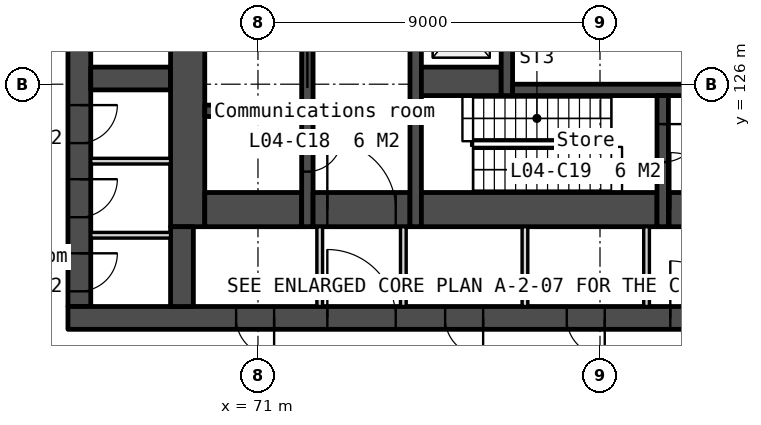
"""IFC4 building model, lengths in metres.
Left out: names, types, materials, properties, quantities, classifications, styles, units other than length and angle.
Written with IfcOpenShell. Run it as: python <this file> out.ifc"""

import sys

from ifc_helpers import new_model, si_unit, direction, frame, frame_2d, origin, place, context, subcontext, project, spatial, rectangle, extrude, element, fill, save


model = new_model("IFC4")
c1 = context("Model", 3, precision=1e-05, world=origin(), true_north=direction((0.0, 1.0)))
c2 = subcontext(c1, "Body", "Model", "MODEL_VIEW")
j1 = project(units=[si_unit("LENGTHUNIT", "METRE"), si_unit("PLANEANGLEUNIT", "RADIAN")], contexts=[c1])
p1 = place(None, origin())
s1 = spatial("IfcSite", under=j1, at=p1, CompositionType="ELEMENT")
p2 = place(p1, origin())
s2 = spatial("IfcBuilding", under=s1, at=p2, CompositionType="ELEMENT")
p3 = place(p2, frame((0.0, 0.0, 25.0)))
s3 = spatial("IfcBuildingStorey", under=s2, at=p3, CompositionType="ELEMENT", Elevation=25.0)
p4 = place(p3, frame((66.3, 133.95, 0.0), z_axis=(0.0, 0.0, 1.0), x_axis=(0.0, -1.0, 0.0)))
e1 = element("IfcWall", 1, at=p4, inside=s3, PredefinedType="SOLIDWALL", context=c2, shape_type="SweptSolid", body=[
    extrude(rectangle(XDim=13.8, YDim=0.6, at=frame_2d((6.9, 0.0))), origin(), (0.0, 0.0, 1.0), 4.7),
])
p5 = place(p4, frame((0.6, 0.0, 0.0)))
e2 = element("IfcOpeningElement", 2, at=p5, cuts=e1, PredefinedType="OPENING", context=c2, shape_type="SweptSolid", body=[
    extrude(rectangle(XDim=1.1, YDim=2.1, at=frame_2d((0.55, 1.05))), frame((0.0, 0.31, 0.0), z_axis=(0.0, -1.0, 0.0), x_axis=(1.0, 0.0, 0.0)), (0.0, 0.0, 1.0), 0.62),
])
p6 = place(p4, frame((12.4, 0.0, 0.0)))
e3 = element("IfcOpeningElement", 3, at=p6, cuts=e1, PredefinedType="OPENING", context=c2, shape_type="SweptSolid", body=[
    extrude(rectangle(XDim=1.0, YDim=2.1, at=frame_2d((0.5, 1.05))), frame((0.0, 0.31, 0.0), z_axis=(0.0, -1.0, 0.0), x_axis=(1.0, 0.0, 0.0)), (0.0, 0.0, 1.0), 0.62),
])
p7 = place(p4, frame((8.5, 0.0, 0.0)))
e4 = element("IfcOpeningElement", 4, at=p7, cuts=e1, PredefinedType="OPENING", context=c2, shape_type="SweptSolid", body=[
    extrude(rectangle(XDim=1.0, YDim=2.1, at=frame_2d((0.5, 1.05))), frame((0.0, 0.31, 0.0), z_axis=(0.0, -1.0, 0.0), x_axis=(1.0, 0.0, 0.0)), (0.0, 0.0, 1.0), 0.62),
])
p8 = place(p4, frame((10.45, 0.0, 0.0)))
e5 = element("IfcOpeningElement", 5, at=p8, cuts=e1, PredefinedType="OPENING", context=c2, shape_type="SweptSolid", body=[
    extrude(rectangle(XDim=1.0, YDim=2.1, at=frame_2d((0.5, 1.05))), frame((0.0, 0.31, 0.0), z_axis=(0.0, -1.0, 0.0), x_axis=(1.0, 0.0, 0.0)), (0.0, 0.0, 1.0), 0.62),
])
p9 = place(p3, frame((66.0, 119.85, 0.0), z_axis=(0.0, 0.0, 1.0), x_axis=(1.0, 0.0, 0.0)))
e6 = element("IfcWall", 6, at=p9, inside=s3, PredefinedType="SOLIDWALL", context=c2, shape_type="SweptSolid", body=[
    extrude(rectangle(XDim=28.0, YDim=0.6, at=frame_2d((14.0, 0.0))), origin(), (0.0, 0.0, 1.0), 4.7),
])
p10 = place(p9, frame((6.825, 0.0, 0.0)))
e7 = element("IfcOpeningElement", 7, at=p10, cuts=e6, PredefinedType="OPENING", context=c2, shape_type="SweptSolid", body=[
    extrude(rectangle(XDim=1.8, YDim=2.1, at=frame_2d((0.9, 1.05))), frame((0.0, 0.31, 0.0), z_axis=(0.0, -1.0, 0.0), x_axis=(1.0, 0.0, 0.0)), (0.0, 0.0, 1.0), 0.62),
])
p11 = place(p9, frame((15.85, 0.0, 0.0)))
e8 = element("IfcOpeningElement", 8, at=p11, cuts=e6, PredefinedType="OPENING", context=c2, shape_type="SweptSolid", body=[
    extrude(rectangle(XDim=1.5, YDim=2.1, at=frame_2d((0.75, 1.05))), frame((0.0, 0.31, 0.0), z_axis=(0.0, -1.0, 0.0), x_axis=(1.0, 0.0, 0.0)), (0.0, 0.0, 1.0), 0.62),
])
p12 = place(p9, frame((19.375, 0.0, 0.0)))
e9 = element("IfcOpeningElement", 9, at=p12, cuts=e6, PredefinedType="OPENING", context=c2, shape_type="SweptSolid", body=[
    extrude(rectangle(XDim=1.8, YDim=2.1, at=frame_2d((0.9, 1.05))), frame((0.0, 0.31, 0.0), z_axis=(0.0, -1.0, 0.0), x_axis=(1.0, 0.0, 0.0)), (0.0, 0.0, 1.0), 0.62),
])
p13 = place(p9, frame((4.425, 0.0, 0.0)))
e10 = element("IfcOpeningElement", 10, at=p13, cuts=e6, PredefinedType="OPENING", context=c2, shape_type="SweptSolid", body=[
    extrude(rectangle(XDim=1.0, YDim=2.1, at=frame_2d((0.5, 1.05))), frame((0.0, 0.31, 0.0), z_axis=(0.0, -1.0, 0.0), x_axis=(1.0, 0.0, 0.0)), (0.0, 0.0, 1.0), 0.62),
])
p14 = place(p9, frame((9.925, 0.0, 0.0)))
e11 = element("IfcOpeningElement", 11, at=p14, cuts=e6, PredefinedType="OPENING", context=c2, shape_type="SweptSolid", body=[
    extrude(rectangle(XDim=1.0, YDim=2.1, at=frame_2d((0.5, 1.05))), frame((0.0, 0.31, 0.0), z_axis=(0.0, -1.0, 0.0), x_axis=(1.0, 0.0, 0.0)), (0.0, 0.0, 1.0), 0.62),
])
p15 = place(p9, frame((13.125, 0.0, 0.0)))
e12 = element("IfcOpeningElement", 12, at=p15, cuts=e6, PredefinedType="OPENING", context=c2, shape_type="SweptSolid", body=[
    extrude(rectangle(XDim=1.0, YDim=2.1, at=frame_2d((0.5, 1.05))), frame((0.0, 0.31, 0.0), z_axis=(0.0, -1.0, 0.0), x_axis=(1.0, 0.0, 0.0)), (0.0, 0.0, 1.0), 0.62),
])
p16 = place(p9, frame((21.725, 0.0, 0.0)))
e13 = element("IfcOpeningElement", 13, at=p16, cuts=e6, PredefinedType="OPENING", context=c2, shape_type="SweptSolid", body=[
    extrude(rectangle(XDim=1.0, YDim=2.1, at=frame_2d((0.5, 1.05))), frame((0.0, 0.31, 0.0), z_axis=(0.0, -1.0, 0.0), x_axis=(1.0, 0.0, 0.0)), (0.0, 0.0, 1.0), 0.62),
])
p17 = place(p9, frame((23.425, 0.0, 0.0)))
e14 = element("IfcOpeningElement", 14, at=p17, cuts=e6, PredefinedType="OPENING", context=c2, shape_type="SweptSolid", body=[
    extrude(rectangle(XDim=1.0, YDim=2.1, at=frame_2d((0.5, 1.05))), frame((0.0, 0.31, 0.0), z_axis=(0.0, -1.0, 0.0), x_axis=(1.0, 0.0, 0.0)), (0.0, 0.0, 1.0), 0.62),
])
p18 = place(p3, frame((66.6, 126.15, 0.0), z_axis=(0.0, 0.0, 1.0), x_axis=(1.0, 0.0, 0.0)))
e15 = element("IfcWall", 15, at=p18, inside=s3, PredefinedType="SOLIDWALL", context=c2, shape_type="SweptSolid", body=[
    extrude(rectangle(XDim=2.1, YDim=0.6, at=frame_2d((1.05, 0.0))), origin(), (0.0, 0.0, 1.0), 4.7),
])
for number, where, z_axis, x_axis in (
    (16, (66.6, 123.975, 0.0), (0.0, 0.0, 1.0), (1.0, 0.0, 0.0)),
    (17, (66.6, 122.025, 0.0), (0.0, 0.0, 1.0), (1.0, 0.0, 0.0)),
):
    element("IfcWall", number, at=place(p3, frame(where, z_axis=z_axis, x_axis=x_axis)), inside=s3, PredefinedType="PARTITIONING", context=c2, shape_type="SweptSolid", body=[
        extrude(rectangle(XDim=2.1, YDim=0.15, at=frame_2d((1.05, 0.0))), origin(), (0.0, 0.0, 1.0), 4.7),
    ])
p19 = place(p3, frame((69.15, 133.95, 0.0), z_axis=(0.0, 0.0, 1.0), x_axis=(0.0, -1.0, 0.0)))
e18 = element("IfcWall", 18, at=p19, inside=s3, PredefinedType="SOLIDWALL", context=c2, shape_type="SweptSolid", body=[
    extrude(rectangle(XDim=11.7, YDim=0.9, at=frame_2d((5.85, 0.0))), origin(), (0.0, 0.0, 1.0), 4.7),
])
p20 = place(p3, frame((69.0, 122.25, 0.0), z_axis=(0.0, 0.0, 1.0), x_axis=(0.0, -1.0, 0.0)))
e19 = element("IfcWall", 19, at=p20, inside=s3, PredefinedType="SOLIDWALL", context=c2, shape_type="SweptSolid", body=[
    extrude(rectangle(XDim=2.1, YDim=0.6, at=frame_2d((1.05, 0.0))), origin(), (0.0, 0.0, 1.0), 4.7),
])
p21 = place(p3, frame((69.6, 125.3, 0.0), z_axis=(0.0, 0.0, 1.0), x_axis=(1.0, 0.0, 0.0)))
e20 = element("IfcWall", 20, at=p21, inside=s3, PredefinedType="SOLIDWALL", context=c2, shape_type="SweptSolid", body=[
    extrude(rectangle(XDim=2.55, YDim=0.3, at=frame_2d((1.275, 0.0))), origin(), (0.0, 0.0, 1.0), 4.7),
])
p22 = place(p3, frame((69.6, 122.7, 0.0), z_axis=(0.0, 0.0, 1.0), x_axis=(1.0, 0.0, 0.0)))
e21 = element("IfcWall", 21, at=p22, inside=s3, PredefinedType="SOLIDWALL", context=c2, shape_type="SweptSolid", body=[
    extrude(rectangle(XDim=2.55, YDim=0.9, at=frame_2d((1.275, 0.0))), origin(), (0.0, 0.0, 1.0), 4.7),
])
p23 = place(p3, frame((72.3, 133.95, 0.0), z_axis=(0.0, 0.0, 1.0), x_axis=(0.0, -1.0, 0.0)))
e22 = element("IfcWall", 22, at=p23, inside=s3, PredefinedType="SOLIDWALL", context=c2, shape_type="SweptSolid", body=[
    extrude(rectangle(XDim=11.7, YDim=0.3, at=frame_2d((5.85, 0.0))), origin(), (0.0, 0.0, 1.0), 4.7),
])
p24 = place(p23, frame((6.95, 0.0, 0.0)))
e23 = element("IfcOpeningElement", 23, at=p24, cuts=e22, PredefinedType="OPENING", context=c2, shape_type="SweptSolid", body=[
    extrude(rectangle(XDim=1.1, YDim=2.1, at=frame_2d((0.55, 1.05))), frame((0.0, 0.16, 0.0), z_axis=(0.0, -1.0, 0.0), x_axis=(1.0, 0.0, 0.0)), (0.0, 0.0, 1.0), 0.32),
])
p25 = place(p23, frame((9.35, 0.0, 0.0)))
e24 = element("IfcOpeningElement", 24, at=p25, cuts=e22, PredefinedType="OPENING", context=c2, shape_type="SweptSolid", body=[
    extrude(rectangle(XDim=0.9, YDim=2.1, at=frame_2d((0.45, 1.05))), frame((0.0, 0.16, 0.0), z_axis=(0.0, -1.0, 0.0), x_axis=(1.0, 0.0, 0.0)), (0.0, 0.0, 1.0), 0.32),
])
p26 = place(p23, frame((5.1, 0.0, 0.0)))
e25 = element("IfcOpeningElement", 25, at=p26, cuts=e22, PredefinedType="OPENING", context=c2, shape_type="SweptSolid", body=[
    extrude(rectangle(XDim=1.0, YDim=2.1, at=frame_2d((0.5, 1.05))), frame((0.0, 0.16, 0.0), z_axis=(0.0, -1.0, 0.0), x_axis=(1.0, 0.0, 0.0)), (0.0, 0.0, 1.0), 0.32),
])
p27 = place(p3, frame((72.45, 122.7, 0.0), z_axis=(0.0, 0.0, 1.0), x_axis=(1.0, 0.0, 0.0)))
e26 = element("IfcWall", 26, at=p27, inside=s3, PredefinedType="SOLIDWALL", context=c2, shape_type="SweptSolid", body=[
    extrude(rectangle(XDim=2.55, YDim=0.9, at=frame_2d((1.275, 0.0))), origin(), (0.0, 0.0, 1.0), 4.7),
])
p28 = place(p27, frame((0.375, 0.0, 0.0)))
e27 = element("IfcOpeningElement", 27, at=p28, cuts=e26, PredefinedType="OPENING", context=c2, shape_type="SweptSolid", body=[
    extrude(rectangle(XDim=1.8, YDim=2.1, at=frame_2d((0.9, 1.05))), frame((0.0, 0.46, 0.0), z_axis=(0.0, -1.0, 0.0), x_axis=(1.0, 0.0, 0.0)), (0.0, 0.0, 1.0), 0.92),
])
for number, where, z_axis, x_axis in (
    (28, (72.625, 122.25, 0.0), (0.0, 0.0, 1.0), (0.0, -1.0, 0.0)),
    (29, (74.825, 122.25, 0.0), (0.0, 0.0, 1.0), (0.0, -1.0, 0.0)),
):
    element("IfcWall", number, at=place(p3, frame(where, z_axis=z_axis, x_axis=x_axis)), inside=s3, PredefinedType="PARTITIONING", context=c2, shape_type="SweptSolid", body=[
        extrude(rectangle(XDim=2.1, YDim=0.15, at=frame_2d((1.05, 0.0))), origin(), (0.0, 0.0, 1.0), 4.7),
    ])
p29 = place(p3, frame((75.15, 133.95, 0.0), z_axis=(0.0, 0.0, 1.0), x_axis=(0.0, -1.0, 0.0)))
e30 = element("IfcWall", 30, at=p29, inside=s3, PredefinedType="SOLIDWALL", context=c2, shape_type="SweptSolid", body=[
    extrude(rectangle(XDim=11.7, YDim=0.3, at=frame_2d((5.85, 0.0))), origin(), (0.0, 0.0, 1.0), 4.7),
])
p30 = place(p3, frame((75.3, 126.075, 0.0), z_axis=(0.0, 0.0, 1.0), x_axis=(1.0, 0.0, 0.0)))
e31 = element("IfcWall", 31, at=p30, inside=s3, PredefinedType="SOLIDWALL", context=c2, shape_type="SweptSolid", body=[
    extrude(rectangle(XDim=2.1, YDim=0.75, at=frame_2d((1.05, 0.0))), origin(), (0.0, 0.0, 1.0), 4.7),
])
p31 = place(p3, frame((75.3, 122.7, 0.0), z_axis=(0.0, 0.0, 1.0), x_axis=(1.0, 0.0, 0.0)))
e32 = element("IfcWall", 32, at=p31, inside=s3, PredefinedType="SOLIDWALL", context=c2, shape_type="SweptSolid", body=[
    extrude(rectangle(XDim=6.2, YDim=0.9, at=frame_2d((3.1, 0.0))), origin(), (0.0, 0.0, 1.0), 4.7),
])
p32 = place(p3, frame((77.55, 133.95, 0.0), z_axis=(0.0, 0.0, 1.0), x_axis=(0.0, -1.0, 0.0)))
e33 = element("IfcWall", 33, at=p32, inside=s3, PredefinedType="SOLIDWALL", context=c2, shape_type="SweptSolid", body=[
    extrude(rectangle(XDim=8.25, YDim=0.3, at=frame_2d((4.125, 0.0))), origin(), (0.0, 0.0, 1.0), 4.7),
])
p33 = place(p32, frame((0.6, 0.0, 0.0)))
e34 = element("IfcOpeningElement", 34, at=p33, cuts=e33, PredefinedType="OPENING", context=c2, shape_type="SweptSolid", body=[
    extrude(rectangle(XDim=1.1, YDim=2.1, at=frame_2d((0.55, 1.05))), frame((0.0, 0.16, 0.0), z_axis=(0.0, -1.0, 0.0), x_axis=(1.0, 0.0, 0.0)), (0.0, 0.0, 1.0), 0.32),
])
p34 = place(p32, frame((3.2, 0.0, 0.0)))
e35 = element("IfcOpeningElement", 35, at=p34, cuts=e33, PredefinedType="OPENING", context=c2, shape_type="SweptSolid", body=[
    extrude(rectangle(XDim=1.1, YDim=2.1, at=frame_2d((0.55, 1.05))), frame((0.0, 0.16, 0.0), z_axis=(0.0, -1.0, 0.0), x_axis=(1.0, 0.0, 0.0)), (0.0, 0.0, 1.0), 0.32),
])
p35 = place(p32, frame((5.8, 0.0, 0.0)))
e36 = element("IfcOpeningElement", 36, at=p35, cuts=e33, PredefinedType="OPENING", context=c2, shape_type="SweptSolid", body=[
    extrude(rectangle(XDim=1.1, YDim=2.1, at=frame_2d((0.55, 1.05))), frame((0.0, 0.16, 0.0), z_axis=(0.0, -1.0, 0.0), x_axis=(1.0, 0.0, 0.0)), (0.0, 0.0, 1.0), 0.32),
])
p36 = place(p3, frame((77.7, 125.85, 0.0), z_axis=(0.0, 0.0, 1.0), x_axis=(1.0, 0.0, 0.0)))
e37 = element("IfcWall", 37, at=p36, inside=s3, PredefinedType="SOLIDWALL", context=c2, shape_type="SweptSolid", body=[
    extrude(rectangle(XDim=4.6, YDim=0.3, at=frame_2d((2.3, 0.0))), origin(), (0.0, 0.0, 1.0), 4.7),
])
for number, where, z_axis, x_axis in (
    (38, (78.025, 122.25, 0.0), (0.0, 0.0, 1.0), (0.0, -1.0, 0.0)),
    (39, (81.225, 122.25, 0.0), (0.0, 0.0, 1.0), (0.0, -1.0, 0.0)),
):
    element("IfcWall", number, at=place(p3, frame(where, z_axis=z_axis, x_axis=x_axis)), inside=s3, PredefinedType="PARTITIONING", context=c2, shape_type="SweptSolid", body=[
        extrude(rectangle(XDim=2.1, YDim=0.15, at=frame_2d((1.05, 0.0))), origin(), (0.0, 0.0, 1.0), 4.7),
    ])
p37 = place(p3, frame((81.65, 125.7, 0.0), z_axis=(0.0, 0.0, 1.0), x_axis=(0.0, -1.0, 0.0)))
e40 = element("IfcWall", 40, at=p37, inside=s3, PredefinedType="SOLIDWALL", context=c2, shape_type="SweptSolid", body=[
    extrude(rectangle(XDim=3.45, YDim=0.3, at=frame_2d((1.725, 0.0))), origin(), (0.0, 0.0, 1.0), 4.7),
])
p38 = place(p37, frame((0.75, 0.0, 0.0)))
e41 = element("IfcOpeningElement", 41, at=p38, cuts=e40, PredefinedType="OPENING", context=c2, shape_type="SweptSolid", body=[
    extrude(rectangle(XDim=1.0, YDim=2.1, at=frame_2d((0.5, 1.05))), frame((0.0, 0.16, 0.0), z_axis=(0.0, -1.0, 0.0), x_axis=(1.0, 0.0, 0.0)), (0.0, 0.0, 1.0), 0.32),
])
p39 = place(p3, frame((81.8, 122.7, 0.0), z_axis=(0.0, 0.0, 1.0), x_axis=(1.0, 0.0, 0.0)))
e42 = element("IfcWall", 42, at=p39, inside=s3, PredefinedType="SOLIDWALL", context=c2, shape_type="SweptSolid", body=[
    extrude(rectangle(XDim=2.9, YDim=0.9, at=frame_2d((1.45, 0.0))), origin(), (0.0, 0.0, 1.0), 4.7),
])
p40 = place(p39, frame((0.05, 0.0, 0.0)))
e43 = element("IfcOpeningElement", 43, at=p40, cuts=e42, PredefinedType="OPENING", context=c2, shape_type="SweptSolid", body=[
    extrude(rectangle(XDim=1.5, YDim=2.1, at=frame_2d((0.75, 1.05))), frame((0.0, 0.46, 0.0), z_axis=(0.0, -1.0, 0.0), x_axis=(1.0, 0.0, 0.0)), (0.0, 0.0, 1.0), 0.92),
])
p41 = place(p3, frame((77.166, 61.679, 0.0), z_axis=(0.0, 0.0, 1.0), x_axis=(-0.500000102728, 0.866025344474, 0.0)))
e44 = element("IfcWall", 44, at=p41, inside=s3, PredefinedType="STANDARD", context=c2, shape_type="SweptSolid", body=[
    extrude(rectangle(XDim=77.841, YDim=1.0, at=frame_2d((38.92, 0.0))), origin(), (0.0, 0.0, 1.0), 0.6),
])
p42 = place(p24, origin())
e45 = element("IfcDoor", 45, at=p42, inside=s3, OperationType="SLIDING_TO_LEFT", PredefinedType="DOOR", context=c2, shape_type="SweptSolid", body=[
    extrude(rectangle(XDim=1.1, YDim=2.1, at=frame_2d((0.55, 1.05))), frame((0.0, 0.025, 0.0), z_axis=(0.0, -1.0, 0.0), x_axis=(1.0, 0.0, 0.0)), (0.0, 0.0, 1.0), 0.05),
])
fill(e23, e45)
p43 = place(p28, origin())
e46 = element("IfcDoor", 46, at=p43, inside=s3, OperationType="DOUBLE_DOOR_DOUBLE_SWING", PredefinedType="DOOR", context=c2, shape_type="SweptSolid", body=[
    extrude(rectangle(XDim=1.8, YDim=2.1, at=frame_2d((0.9, 1.05))), frame((0.0, 0.025, 0.0), z_axis=(0.0, -1.0, 0.0), x_axis=(1.0, 0.0, 0.0)), (0.0, 0.0, 1.0), 0.05),
])
fill(e27, e46)
p44 = place(p40, origin())
e47 = element("IfcDoor", 47, at=p44, inside=s3, OperationType="DOUBLE_DOOR_DOUBLE_SWING", PredefinedType="DOOR", context=c2, shape_type="SweptSolid", body=[
    extrude(rectangle(XDim=1.5, YDim=2.1, at=frame_2d((0.75, 1.05))), frame((0.0, 0.025, 0.0), z_axis=(0.0, -1.0, 0.0), x_axis=(1.0, 0.0, 0.0)), (0.0, 0.0, 1.0), 0.05),
])
fill(e43, e47)
p45 = place(p10, origin())
e48 = element("IfcDoor", 48, at=p45, inside=s3, OperationType="DOUBLE_DOOR_DOUBLE_SWING", PredefinedType="DOOR", context=c2, shape_type="SweptSolid", body=[
    extrude(rectangle(XDim=1.8, YDim=2.1, at=frame_2d((0.9, 1.05))), frame((0.0, 0.025, 0.0), z_axis=(0.0, -1.0, 0.0), x_axis=(1.0, 0.0, 0.0)), (0.0, 0.0, 1.0), 0.05),
])
fill(e7, e48)
p46 = place(p11, origin())
e49 = element("IfcDoor", 49, at=p46, inside=s3, OperationType="DOUBLE_DOOR_DOUBLE_SWING", PredefinedType="DOOR", context=c2, shape_type="SweptSolid", body=[
    extrude(rectangle(XDim=1.5, YDim=2.1, at=frame_2d((0.75, 1.05))), frame((0.0, 0.025, 0.0), z_axis=(0.0, -1.0, 0.0), x_axis=(1.0, 0.0, 0.0)), (0.0, 0.0, 1.0), 0.05),
])
fill(e8, e49)
p47 = place(p25, origin())
e50 = element("IfcDoor", 50, at=p47, inside=s3, OperationType="SINGLE_SWING_LEFT", PredefinedType="DOOR", context=c2, shape_type="SweptSolid", body=[
    extrude(rectangle(XDim=0.9, YDim=2.1, at=frame_2d((0.45, 1.05))), frame((0.0, 0.025, 0.0), z_axis=(0.0, -1.0, 0.0), x_axis=(1.0, 0.0, 0.0)), (0.0, 0.0, 1.0), 0.05),
])
fill(e24, e50)
p48 = place(p13, origin())
e51 = element("IfcDoor", 51, at=p48, inside=s3, OperationType="SINGLE_SWING_RIGHT", PredefinedType="DOOR", context=c2, shape_type="SweptSolid", body=[
    extrude(rectangle(XDim=1.0, YDim=2.1, at=frame_2d((0.5, 1.05))), frame((0.0, 0.025, 0.0), z_axis=(0.0, -1.0, 0.0), x_axis=(1.0, 0.0, 0.0)), (0.0, 0.0, 1.0), 0.05),
])
fill(e10, e51)
p49 = place(p14, origin())
e52 = element("IfcDoor", 52, at=p49, inside=s3, OperationType="SINGLE_SWING_RIGHT", PredefinedType="DOOR", context=c2, shape_type="SweptSolid", body=[
    extrude(rectangle(XDim=1.0, YDim=2.1, at=frame_2d((0.5, 1.05))), frame((0.0, 0.025, 0.0), z_axis=(0.0, -1.0, 0.0), x_axis=(1.0, 0.0, 0.0)), (0.0, 0.0, 1.0), 0.05),
])
fill(e11, e52)
p50 = place(p15, origin())
e53 = element("IfcDoor", 53, at=p50, inside=s3, OperationType="SINGLE_SWING_RIGHT", PredefinedType="DOOR", context=c2, shape_type="SweptSolid", body=[
    extrude(rectangle(XDim=1.0, YDim=2.1, at=frame_2d((0.5, 1.05))), frame((0.0, 0.025, 0.0), z_axis=(0.0, -1.0, 0.0), x_axis=(1.0, 0.0, 0.0)), (0.0, 0.0, 1.0), 0.05),
])
fill(e12, e53)
p51 = place(p38, origin())
e54 = element("IfcDoor", 54, at=p51, inside=s3, OperationType="SINGLE_SWING_LEFT", PredefinedType="DOOR", context=c2, shape_type="SweptSolid", body=[
    extrude(rectangle(XDim=1.0, YDim=2.1, at=frame_2d((0.5, 1.05))), frame((0.0, 0.025, 0.0), z_axis=(0.0, -1.0, 0.0), x_axis=(1.0, 0.0, 0.0)), (0.0, 0.0, 1.0), 0.05),
])
fill(e41, e54)
p52 = place(p6, origin())
e55 = element("IfcDoor", 55, at=p52, inside=s3, OperationType="SINGLE_SWING_LEFT", PredefinedType="DOOR", context=c2, shape_type="SweptSolid", body=[
    extrude(rectangle(XDim=1.0, YDim=2.1, at=frame_2d((0.5, 1.05))), frame((0.0, 0.025, 0.0), z_axis=(0.0, -1.0, 0.0), x_axis=(1.0, 0.0, 0.0)), (0.0, 0.0, 1.0), 0.05),
])
fill(e3, e55)
p53 = place(p7, origin())
e56 = element("IfcDoor", 56, at=p53, inside=s3, OperationType="SINGLE_SWING_LEFT", PredefinedType="DOOR", context=c2, shape_type="SweptSolid", body=[
    extrude(rectangle(XDim=1.0, YDim=2.1, at=frame_2d((0.5, 1.05))), frame((0.0, 0.025, 0.0), z_axis=(0.0, -1.0, 0.0), x_axis=(1.0, 0.0, 0.0)), (0.0, 0.0, 1.0), 0.05),
])
fill(e4, e56)
p54 = place(p8, origin())
e57 = element("IfcDoor", 57, at=p54, inside=s3, OperationType="SINGLE_SWING_LEFT", PredefinedType="DOOR", context=c2, shape_type="SweptSolid", body=[
    extrude(rectangle(XDim=1.0, YDim=2.1, at=frame_2d((0.5, 1.05))), frame((0.0, 0.025, 0.0), z_axis=(0.0, -1.0, 0.0), x_axis=(1.0, 0.0, 0.0)), (0.0, 0.0, 1.0), 0.05),
])
fill(e5, e57)
save(model, sys.argv[1])
